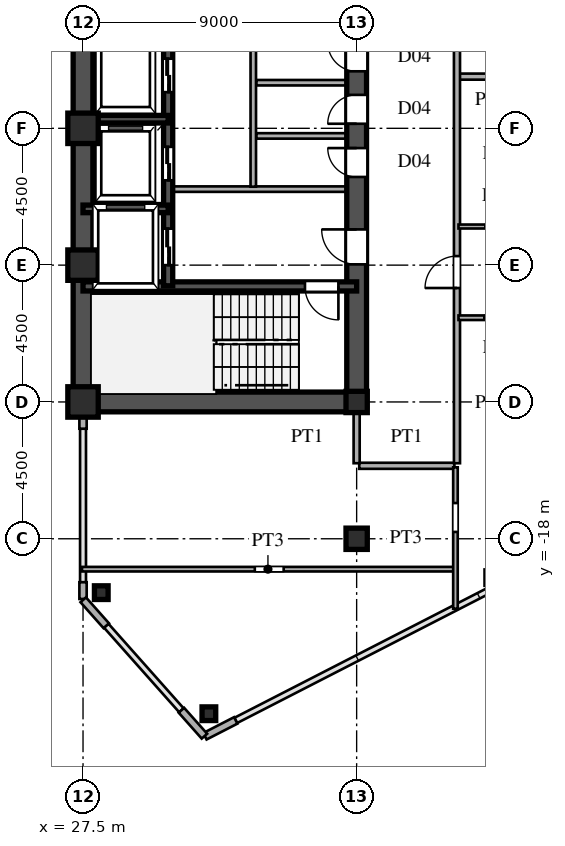
"""IFC4 building model, lengths in metres.
Left out: names, types, materials, properties, quantities, classifications, styles, units other than length and angle.
Written with IfcOpenShell. Run it as: python <this file> out.ifc"""

import sys

from ifc_helpers import new_model, si_unit, direction, frame, frame_2d, origin, origin_2d, place, context, subcontext, project, spatial, rectangle, hollow_rectangle, i_section, extrude, source, transform, mapped, element, fill, save


model = new_model("IFC4")
c1 = context("Model", 3, precision=1e-05, world=origin(), true_north=direction((0.0, 1.0)))
c2 = subcontext(c1, "Body", "Model", "MODEL_VIEW")
j1 = project(units=[si_unit("LENGTHUNIT", "METRE"), si_unit("PLANEANGLEUNIT", "RADIAN")], contexts=[c1])
p1 = place(None, origin())
s1 = spatial("IfcSite", under=j1, at=p1, CompositionType="ELEMENT")
p2 = place(p1, origin())
s2 = spatial("IfcBuilding", under=s1, at=p2, CompositionType="ELEMENT")
p3 = place(p2, frame((0.0, 0.0, 121.2)))
s3 = spatial("IfcBuildingStorey", under=s2, at=p3, CompositionType="ELEMENT", Elevation=121.2)
m1 = source(origin(), c2, "Body", "SweptSolid", [
    extrude(hollow_rectangle(XDim=1.0, YDim=1.0, WallThickness=0.042, at=origin_2d()), origin(), (0.0, 0.0, 1.0), 3.6),
])
for number, where, z_axis, x_axis in (
    (1, (27.5, -13.5, 0.0), (0.0, 0.0, 1.0), (1.0, 0.0, 0.0)),
    (2, (27.5, -9.0, 0.0), (0.0, 0.0, 1.0), (1.0, 0.0, 0.0)),
    (3, (27.5, -4.5, 0.0), (0.0, 0.0, 1.0), (1.0, 0.0, 0.0)),
):
    element("IfcColumn", number, at=place(p3, frame(where, z_axis=z_axis, x_axis=x_axis)), inside=s3, PredefinedType="COLUMN", context=c2, shape_type="MappedRepresentation", body=[
        mapped(m1, transform((0.0, 0.0, 0.0), scale=1.0)),
    ])
m2 = source(origin(), c2, "Body", "SweptSolid", [
    extrude(i_section(OverallWidth=0.7, OverallDepth=0.7, WebThickness=0.028, FlangeThickness=0.045, at=origin_2d()), origin(), (0.0, 0.0, 1.0), 3.6),
])
for number, where, z_axis, x_axis in (
    (4, (36.5, -18.0, 0.0), (0.0, 0.0, 1.0), (1.0, 0.0, 0.0)),
    (5, (36.5, -13.5, 0.0), (0.0, 0.0, 1.0), (1.0, 0.0, 0.0)),
):
    element("IfcColumn", number, at=place(p3, frame(where, z_axis=z_axis, x_axis=x_axis)), inside=s3, PredefinedType="COLUMN", context=c2, shape_type="MappedRepresentation", body=[
        mapped(m2, transform((0.0, 0.0, 0.0), scale=1.0)),
    ])
m3 = source(origin(), c2, "Body", "SweptSolid", [
    extrude(hollow_rectangle(XDim=0.45, YDim=0.45, WallThickness=0.018, at=origin_2d()), origin(), (0.0, 0.0, 1.0), 3.6),
])
for number, where, z_axis, x_axis in (
    (6, (31.64, -23.754, 0.0), (0.0, 0.0, 1.0), (1.0, 0.0, 0.0)),
    (7, (28.1, -19.772, 0.0), (0.0, 0.0, 1.0), (1.0, 0.0, 0.0)),
):
    element("IfcColumn", number, at=place(p3, frame(where, z_axis=z_axis, x_axis=x_axis)), inside=s3, PredefinedType="COLUMN", context=c2, shape_type="MappedRepresentation", body=[
        mapped(m3, transform((0.0, 0.0, 0.0), scale=1.0)),
    ])
p4 = place(p3, frame((31.509, -24.495, 0.0), z_axis=(0.0, 0.0, 1.0), x_axis=(0.889797395748, 0.456355776255, 0.0)))
e8 = element("IfcWall", 8, at=p4, inside=s3, PredefinedType="SOLIDWALL", context=c2, shape_type="SweptSolid", body=[
    extrude(rectangle(XDim=1.14, YDim=0.24, at=frame_2d((0.57, 0.0))), origin(), (0.0, 0.0, 1.0), 3.38),
])
p5 = place(p3, frame((27.5, -19.98, 0.0), z_axis=(0.0, 0.0, 1.0), x_axis=(0.0, 1.0, 0.0)))
e9 = element("IfcWall", 9, at=p5, inside=s3, PredefinedType="SOLIDWALL", context=c2, shape_type="SweptSolid", body=[
    extrude(rectangle(XDim=0.55, YDim=0.24, at=frame_2d((0.275, 0.0))), origin(), (0.0, 0.0, 1.0), 3.38),
])
p6 = place(p3, frame((27.5, -14.38, 0.0), z_axis=(0.0, 0.0, 1.0), x_axis=(0.0, 1.0, 0.0)))
e10 = element("IfcWall", 10, at=p6, inside=s3, PredefinedType="SOLIDWALL", context=c2, shape_type="SweptSolid", body=[
    extrude(rectangle(XDim=0.55, YDim=0.24, at=frame_2d((0.275, 0.0))), origin(), (0.0, 0.0, 1.0), 2.88),
])
for number, where, z_axis, x_axis in (
    (11, (27.507, -20.008, 0.0), (0.0, 0.0, 1.0), (0.664, -0.747, 0.0)),
    (12, (30.736, -23.64, 0.0), (0.0, 0.0, 1.0), (0.664, -0.747, 0.0)),
):
    element("IfcWall", number, at=place(p3, frame(where, z_axis=z_axis, x_axis=x_axis)), inside=s3, PredefinedType="SOLIDWALL", context=c2, shape_type="SweptSolid", body=[
        extrude(rectangle(XDim=1.14, YDim=0.24, at=frame_2d((0.57, 0.0))), origin(), (0.0, 0.0, 1.0), 3.38),
    ])
p7 = place(p3, frame((27.5, -13.5, 0.0), z_axis=(0.0, 0.0, 1.0), x_axis=(0.0, 1.0, 0.0)))
e13 = element("IfcWall", 13, at=p7, inside=s3, PredefinedType="SHEAR", context=c2, shape_type="SweptSolid", body=[
    extrude(rectangle(XDim=12.2, YDim=0.65, at=frame_2d((6.1, 0.0))), origin(), (0.0, 0.0, 1.0), 3.38),
])
p8 = place(p3, frame((27.5, -13.5, 0.0), z_axis=(0.0, 0.0, 1.0), x_axis=(1.0, 0.0, 0.0)))
e14 = element("IfcWall", 14, at=p8, inside=s3, PredefinedType="SHEAR", context=c2, shape_type="SweptSolid", body=[
    extrude(rectangle(XDim=9.0, YDim=0.65, at=frame_2d((4.5, 0.0))), origin(), (0.0, 0.0, 1.0), 3.38),
])
p9 = place(p3, frame((36.5, -13.65, 0.0), z_axis=(0.0, 0.0, 1.0), x_axis=(0.0, 1.0, 0.0)))
e15 = element("IfcWall", 15, at=p9, inside=s3, PredefinedType="SHEAR", context=c2, shape_type="SweptSolid", body=[
    extrude(rectangle(XDim=7.15, YDim=0.65, at=frame_2d((3.575, 0.0))), origin(), (0.0, 0.0, 1.0), 3.38),
])
p10 = place(p9, frame((4.675, 0.0, 0.0)))
e16 = element("IfcOpeningElement", 16, at=p10, cuts=e15, PredefinedType="OPENING", context=c2, shape_type="SweptSolid", body=[
    extrude(rectangle(XDim=1.15, YDim=2.2, at=frame_2d((0.575, 1.1))), frame((0.0, 0.335, 0.0), z_axis=(0.0, -1.0, 0.0), x_axis=(1.0, 0.0, 0.0)), (0.0, 0.0, 1.0), 0.67),
])
p11 = place(p3, frame((36.5, -6.5, 0.0), z_axis=(0.0, 0.0, 1.0), x_axis=(0.0, 1.0, 0.0)))
e17 = element("IfcWall", 17, at=p11, inside=s3, PredefinedType="SHEAR", context=c2, shape_type="SweptSolid", body=[
    extrude(rectangle(XDim=1.75, YDim=0.65, at=frame_2d((0.875, 0.0))), origin(), (0.0, 0.0, 1.0), 3.38),
])
p12 = place(p11, frame((0.4, 0.0, 0.0)))
e18 = element("IfcOpeningElement", 18, at=p12, cuts=e17, PredefinedType="OPENING", context=c2, shape_type="SweptSolid", body=[
    extrude(rectangle(XDim=0.95, YDim=2.15, at=frame_2d((0.475, 1.075))), frame((0.0, 0.335, 0.0), z_axis=(0.0, -1.0, 0.0), x_axis=(1.0, 0.0, 0.0)), (0.0, 0.0, 1.0), 0.67),
])
p13 = place(p3, frame((36.5, -4.75, 0.0), z_axis=(0.0, 0.0, 1.0), x_axis=(0.0, 1.0, 0.0)))
e19 = element("IfcWall", 19, at=p13, inside=s3, PredefinedType="SHEAR", context=c2, shape_type="SweptSolid", body=[
    extrude(rectangle(XDim=1.75, YDim=0.65, at=frame_2d((0.875, 0.0))), origin(), (0.0, 0.0, 1.0), 3.38),
])
p14 = place(p13, frame((0.4, 0.0, 0.0)))
e20 = element("IfcOpeningElement", 20, at=p14, cuts=e19, PredefinedType="OPENING", context=c2, shape_type="SweptSolid", body=[
    extrude(rectangle(XDim=0.95, YDim=2.15, at=frame_2d((0.475, 1.075))), frame((0.0, 0.335, 0.0), z_axis=(0.0, -1.0, 0.0), x_axis=(1.0, 0.0, 0.0)), (0.0, 0.0, 1.0), 0.67),
])
p15 = place(p3, frame((36.5, -3.0, 0.0), z_axis=(0.0, 0.0, 1.0), x_axis=(0.0, 1.0, 0.0)))
e21 = element("IfcWall", 21, at=p15, inside=s3, PredefinedType="SHEAR", context=c2, shape_type="SweptSolid", body=[
    extrude(rectangle(XDim=1.7, YDim=0.65, at=frame_2d((0.85, 0.0))), origin(), (0.0, 0.0, 1.0), 3.38),
])
p16 = place(p15, frame((0.375, 0.0, 0.0)))
e22 = element("IfcOpeningElement", 22, at=p16, cuts=e21, PredefinedType="OPENING", context=c2, shape_type="SweptSolid", body=[
    extrude(rectangle(XDim=0.95, YDim=2.15, at=frame_2d((0.475, 1.075))), frame((0.0, 0.335, 0.0), z_axis=(0.0, -1.0, 0.0), x_axis=(1.0, 0.0, 0.0)), (0.0, 0.0, 1.0), 0.67),
])
p17 = place(p3, frame((27.5, -9.7, 0.0), z_axis=(0.0, 0.0, 1.0), x_axis=(1.0, 0.0, 0.0)))
e23 = element("IfcWall", 23, at=p17, inside=s3, PredefinedType="SHEAR", context=c2, shape_type="SweptSolid", body=[
    extrude(rectangle(XDim=9.0, YDim=0.3, at=frame_2d((4.5, 0.0))), origin(), (0.0, 0.0, 1.0), 3.38),
])
p18 = place(p17, frame((7.3, 0.0, 0.0)))
e24 = element("IfcOpeningElement", 24, at=p18, cuts=e23, PredefinedType="OPENING", context=c2, shape_type="SweptSolid", body=[
    extrude(rectangle(XDim=1.1, YDim=2.2, at=frame_2d((0.55, 1.1))), frame((0.0, 0.16, 0.0), z_axis=(0.0, -1.0, 0.0), x_axis=(1.0, 0.0, 0.0)), (0.0, 0.0, 1.0), 0.32),
])
for number, where, z_axis, x_axis in (
    (25, (27.5, -7.15, 0.0), (0.0, 0.0, 1.0), (1.0, 0.0, 0.0)),
    (26, (27.5, -4.2, 0.0), (0.0, 0.0, 1.0), (1.0, 0.0, 0.0)),
):
    element("IfcWall", number, at=place(p3, frame(where, z_axis=z_axis, x_axis=x_axis)), inside=s3, PredefinedType="SHEAR", context=c2, shape_type="SweptSolid", body=[
        extrude(rectangle(XDim=2.8, YDim=0.25, at=frame_2d((1.4, 0.0))), origin(), (0.0, 0.0, 1.0), 3.38),
    ])
p19 = place(p3, frame((30.3, -9.68, 0.0), z_axis=(0.0, 0.0, 1.0), x_axis=(0.0, 1.0, 0.0)))
e27 = element("IfcWall", 27, at=p19, inside=s3, PredefinedType="SHEAR", context=c2, shape_type="SweptSolid", body=[
    extrude(rectangle(XDim=2.56, YDim=0.3, at=frame_2d((1.28, 0.0))), origin(), (0.0, 0.0, 1.0), 3.38),
])
p20 = place(p19, frame((0.68, 0.0, 0.0)))
e28 = element("IfcOpeningElement", 28, at=p20, cuts=e27, PredefinedType="OPENING", context=c2, shape_type="SweptSolid", body=[
    extrude(rectangle(XDim=1.2, YDim=2.25, at=frame_2d((0.6, 1.125))), frame((0.0, 0.16, 0.0), z_axis=(0.0, -1.0, 0.0), x_axis=(1.0, 0.0, 0.0)), (0.0, 0.0, 1.0), 0.32),
])
p21 = place(p3, frame((30.3, -7.12, 0.0), z_axis=(0.0, 0.0, 1.0), x_axis=(0.0, 1.0, 0.0)))
e29 = element("IfcWall", 29, at=p21, inside=s3, PredefinedType="SHEAR", context=c2, shape_type="SweptSolid", body=[
    extrude(rectangle(XDim=2.92, YDim=0.3, at=frame_2d((1.46, 0.0))), origin(), (0.0, 0.0, 1.0), 3.38),
])
p22 = place(p21, frame((0.91, 0.0, 0.0)))
e30 = element("IfcOpeningElement", 30, at=p22, cuts=e29, PredefinedType="OPENING", context=c2, shape_type="SweptSolid", body=[
    extrude(rectangle(XDim=1.1, YDim=2.2, at=frame_2d((0.55, 1.1))), frame((0.0, 0.16, 0.0), z_axis=(0.0, -1.0, 0.0), x_axis=(1.0, 0.0, 0.0)), (0.0, 0.0, 1.0), 0.32),
])
p23 = place(p3, frame((30.3, -4.2, 0.0), z_axis=(0.0, 0.0, 1.0), x_axis=(0.0, 1.0, 0.0)))
e31 = element("IfcWall", 31, at=p23, inside=s3, PredefinedType="SHEAR", context=c2, shape_type="SweptSolid", body=[
    extrude(rectangle(XDim=2.88, YDim=0.3, at=frame_2d((1.44, 0.0))), origin(), (0.0, 0.0, 1.0), 3.38),
])
p24 = place(p23, frame((0.89, 0.0, 0.0)))
e32 = element("IfcOpeningElement", 32, at=p24, cuts=e31, PredefinedType="OPENING", context=c2, shape_type="SweptSolid", body=[
    extrude(rectangle(XDim=1.1, YDim=2.2, at=frame_2d((0.55, 1.1))), frame((0.0, 0.16, 0.0), z_axis=(0.0, -1.0, 0.0), x_axis=(1.0, 0.0, 0.0)), (0.0, 0.0, 1.0), 0.32),
])
p25 = place(p3, frame((30.45, -6.5, 0.0), z_axis=(0.0, 0.0, 1.0), x_axis=(1.0, 0.0, 0.0)))
e33 = element("IfcWall", 33, at=p25, inside=s3, PredefinedType="PARTITIONING", context=c2, shape_type="SweptSolid", body=[
    extrude(rectangle(XDim=5.7, YDim=0.18, at=frame_2d((2.85, 0.0))), origin(), (0.0, 0.0, 1.0), 3.38),
])
p26 = place(p3, frame((33.1, -6.42, 0.0), z_axis=(0.0, 0.0, 1.0), x_axis=(0.0, 1.0, 0.0)))
e34 = element("IfcWall", 34, at=p26, inside=s3, PredefinedType="PARTITIONING", context=c2, shape_type="SweptSolid", body=[
    extrude(rectangle(XDim=5.04, YDim=0.18, at=frame_2d((2.52, 0.0))), origin(), (0.0, 0.0, 1.0), 3.38),
])
for number, where, z_axis, x_axis in (
    (35, (33.2, -4.75, 0.0), (0.0, 0.0, 1.0), (1.0, 0.0, 0.0)),
    (36, (33.2, -3.0, 0.0), (0.0, 0.0, 1.0), (1.0, 0.0, 0.0)),
):
    element("IfcWall", number, at=place(p3, frame(where, z_axis=z_axis, x_axis=x_axis)), inside=s3, PredefinedType="PARTITIONING", context=c2, shape_type="SweptSolid", body=[
        extrude(rectangle(XDim=2.95, YDim=0.18, at=frame_2d((1.475, 0.0))), origin(), (0.0, 0.0, 1.0), 3.38),
    ])
p27 = place(p3, frame((27.465, -19.0, 0.0), z_axis=(0.0, 0.0, 1.0), x_axis=(1.0, 0.0, 0.0)))
e37 = element("IfcWall", 37, at=p27, inside=s3, PredefinedType="PARTITIONING", context=c2, shape_type="SweptSolid", body=[
    extrude(rectangle(XDim=12.235, YDim=0.15, at=frame_2d((6.117, 0.0))), origin(), (0.0, 0.0, 1.0), 3.38),
])
p28 = place(p27, frame((5.685, 0.0, 0.0)))
e38 = element("IfcOpeningElement", 38, at=p28, cuts=e37, PredefinedType="OPENING", context=c2, shape_type="SweptSolid", body=[
    extrude(rectangle(XDim=0.95, YDim=2.15, at=frame_2d((0.475, 1.075))), frame((0.0, 0.085, 0.0), z_axis=(0.0, -1.0, 0.0), x_axis=(1.0, 0.0, 0.0)), (0.0, 0.0, 1.0), 0.17),
])
p29 = place(p3, frame((36.585, -15.6, 0.0), z_axis=(0.0, 0.0, 1.0), x_axis=(1.0, 0.0, 0.0)))
e39 = element("IfcWall", 39, at=p29, inside=s3, PredefinedType="PARTITIONING", context=c2, shape_type="SweptSolid", body=[
    extrude(rectangle(XDim=3.13, YDim=0.2, at=frame_2d((1.565, 0.0))), origin(), (0.0, 0.0, 1.0), 3.38),
])
p30 = place(p3, frame((39.85, -10.73, 0.0), z_axis=(0.0, 0.0, 1.0), x_axis=(1.0, 0.0, 0.0)))
e40 = element("IfcWall", 40, at=p30, inside=s3, PredefinedType="PARTITIONING", context=c2, shape_type="SweptSolid", body=[
    extrude(rectangle(XDim=2.65, YDim=0.15, at=frame_2d((1.325, 0.0))), origin(), (0.0, 0.0, 1.0), 3.38),
])
p31 = place(p30, frame((0.85, 0.0, 0.0)))
e41 = element("IfcOpeningElement", 41, at=p31, cuts=e40, PredefinedType="OPENING", context=c2, shape_type="SweptSolid", body=[
    extrude(rectangle(XDim=0.95, YDim=2.15, at=frame_2d((0.475, 1.075))), frame((0.0, 0.085, 0.0), z_axis=(0.0, -1.0, 0.0), x_axis=(1.0, 0.0, 0.0)), (0.0, 0.0, 1.0), 0.17),
])
p32 = place(p3, frame((39.85, -7.73, 0.0), z_axis=(0.0, 0.0, 1.0), x_axis=(1.0, 0.0, 0.0)))
e42 = element("IfcWall", 42, at=p32, inside=s3, PredefinedType="PARTITIONING", context=c2, shape_type="SweptSolid", body=[
    extrude(rectangle(XDim=2.65, YDim=0.13, at=frame_2d((1.325, 0.0))), origin(), (0.0, 0.0, 1.0), 3.38),
])
p33 = place(p32, frame((0.885, 0.0, 0.0)))
e43 = element("IfcOpeningElement", 43, at=p33, cuts=e42, PredefinedType="OPENING", context=c2, shape_type="SweptSolid", body=[
    extrude(rectangle(XDim=0.88, YDim=2.1, at=frame_2d((0.44, 1.05))), frame((0.0, 0.075, 0.0), z_axis=(0.0, -1.0, 0.0), x_axis=(1.0, 0.0, 0.0)), (0.0, 0.0, 1.0), 0.15),
])
p34 = place(p3, frame((39.88, -2.8, 0.0), z_axis=(0.0, 0.0, 1.0), x_axis=(1.0, 0.0, 0.0)))
e44 = element("IfcWall", 44, at=p34, inside=s3, PredefinedType="PARTITIONING", context=c2, shape_type="SweptSolid", body=[
    extrude(rectangle(XDim=29.625, YDim=0.2, at=frame_2d((14.812, 0.0))), origin(), (0.0, 0.0, 1.0), 3.38),
])
p35 = place(p3, frame((36.5, -15.515, 0.0), z_axis=(0.0, 0.0, 1.0), x_axis=(0.0, 1.0, 0.0)))
e45 = element("IfcWall", 45, at=p35, inside=s3, PredefinedType="PARTITIONING", context=c2, shape_type="SweptSolid", body=[
    extrude(rectangle(XDim=1.685, YDim=0.2, at=frame_2d((0.842, 0.0))), origin(), (0.0, 0.0, 1.0), 2.78),
])
p36 = place(p3, frame((39.75, -20.301, 0.0), z_axis=(0.0, 0.0, 1.0), x_axis=(0.0, 1.0, 0.0)))
e46 = element("IfcWall", 46, at=p36, inside=s3, PredefinedType="PARTITIONING", context=c2, shape_type="SweptSolid", body=[
    extrude(rectangle(XDim=4.651, YDim=0.15, at=frame_2d((2.326, 0.0))), origin(), (0.0, 0.0, 1.0), 3.38),
])
p37 = place(p36, frame((2.526, 0.0, 0.0)))
e47 = element("IfcOpeningElement", 47, at=p37, cuts=e46, PredefinedType="OPENING", context=c2, shape_type="SweptSolid", body=[
    extrude(rectangle(XDim=0.95, YDim=2.15, at=frame_2d((0.475, 1.075))), frame((0.0, 0.085, 0.0), z_axis=(0.0, -1.0, 0.0), x_axis=(1.0, 0.0, 0.0)), (0.0, 0.0, 1.0), 0.17),
])
p38 = place(p3, frame((39.8, -15.515, 0.0), z_axis=(0.0, 0.0, 1.0), x_axis=(0.0, 1.0, 0.0)))
e48 = element("IfcWall", 48, at=p38, inside=s3, PredefinedType="PARTITIONING", context=c2, shape_type="SweptSolid", body=[
    extrude(rectangle(XDim=31.03, YDim=0.2, at=frame_2d((15.515, 0.0))), origin(), (0.0, 0.0, 1.0), 3.38),
])
p39 = place(p38, frame((5.762, 0.0, 0.0)))
e49 = element("IfcOpeningElement", 49, at=p39, cuts=e48, PredefinedType="OPENING", context=c2, shape_type="SweptSolid", body=[
    extrude(rectangle(XDim=1.05, YDim=2.25, at=frame_2d((0.525, 1.125))), frame((0.0, 0.11, 0.0), z_axis=(0.0, -1.0, 0.0), x_axis=(1.0, 0.0, 0.0)), (0.0, 0.0, 1.0), 0.22),
])
p40 = place(p38, frame((18.301, 0.0, 0.0)))
e50 = element("IfcOpeningElement", 50, at=p40, cuts=e48, PredefinedType="OPENING", context=c2, shape_type="SweptSolid", body=[
    extrude(rectangle(XDim=1.05, YDim=2.25, at=frame_2d((0.525, 1.125))), frame((0.0, 0.11, 0.0), z_axis=(0.0, -1.0, 0.0), x_axis=(1.0, 0.0, 0.0)), (0.0, 0.0, 1.0), 0.22),
])
p41 = place(p38, frame((27.69, 0.0, 0.0)))
e51 = element("IfcOpeningElement", 51, at=p41, cuts=e48, PredefinedType="OPENING", context=c2, shape_type="SweptSolid", body=[
    extrude(rectangle(XDim=1.05, YDim=2.25, at=frame_2d((0.525, 1.125))), frame((0.0, 0.11, 0.0), z_axis=(0.0, -1.0, 0.0), x_axis=(1.0, 0.0, 0.0)), (0.0, 0.0, 1.0), 0.22),
])
m4 = source(origin(), c2, "Body", "SweptSolid", [
    extrude(rectangle(XDim=1.15, YDim=2.2, at=frame_2d((0.575, 1.1))), frame((0.0, 0.025, 0.0), z_axis=(0.0, -1.0, 0.0), x_axis=(1.0, 0.0, 0.0)), (0.0, 0.0, 1.0), 0.05),
])
p42 = place(p10, origin())
e52 = element("IfcDoor", 52, at=p42, inside=s3, OperationType="SINGLE_SWING_RIGHT", PredefinedType="DOOR", context=c2, shape_type="MappedRepresentation", body=[
    mapped(m4, transform((0.0, 0.0, 0.0), scale=1.0)),
])
fill(e16, e52)
m5 = source(origin(), c2, "Body", "SweptSolid", [
    extrude(rectangle(XDim=0.95, YDim=2.15, at=frame_2d((0.475, 1.075))), frame((0.0, 0.025, 0.0), z_axis=(0.0, -1.0, 0.0), x_axis=(1.0, 0.0, 0.0)), (0.0, 0.0, 1.0), 0.05),
])
p43 = place(p12, origin())
e53 = element("IfcDoor", 53, at=p43, inside=s3, OperationType="SINGLE_SWING_RIGHT", PredefinedType="DOOR", context=c2, shape_type="MappedRepresentation", body=[
    mapped(m5, transform((0.0, 0.0, 0.0), scale=1.0)),
])
fill(e18, e53)
p44 = place(p14, origin())
e54 = element("IfcDoor", 54, at=p44, inside=s3, OperationType="SINGLE_SWING_LEFT", PredefinedType="DOOR", context=c2, shape_type="MappedRepresentation", body=[
    mapped(m5, transform((0.0, 0.0, 0.0), scale=1.0)),
])
fill(e20, e54)
p45 = place(p16, origin())
e55 = element("IfcDoor", 55, at=p45, inside=s3, OperationType="SINGLE_SWING_RIGHT", PredefinedType="DOOR", context=c2, shape_type="MappedRepresentation", body=[
    mapped(m5, transform((0.0, 0.0, 0.0), scale=1.0)),
])
fill(e22, e55)
m6 = source(origin(), c2, "Body", "SweptSolid", [
    extrude(rectangle(XDim=1.1, YDim=2.2, at=frame_2d((0.55, 1.1))), frame((0.0, 0.025, 0.0), z_axis=(0.0, -1.0, 0.0), x_axis=(1.0, 0.0, 0.0)), (0.0, 0.0, 1.0), 0.05),
])
p46 = place(p18, frame((1.1, 0.0, 0.0), z_axis=(0.0, 0.0, 1.0), x_axis=(-1.0, 0.0, 0.0)))
e56 = element("IfcDoor", 56, at=p46, inside=s3, OperationType="SINGLE_SWING_RIGHT", PredefinedType="DOOR", context=c2, shape_type="MappedRepresentation", body=[
    mapped(m6, transform((0.0, 0.0, 0.0), scale=1.0)),
])
fill(e24, e56)
m7 = source(origin(), c2, "Body", "SweptSolid", [
    extrude(rectangle(XDim=1.2, YDim=2.25, at=frame_2d((0.6, 1.125))), frame((0.0, 0.025, 0.0), z_axis=(0.0, -1.0, 0.0), x_axis=(1.0, 0.0, 0.0)), (0.0, 0.0, 1.0), 0.05),
])
p47 = place(p20, origin())
e57 = element("IfcDoor", 57, at=p47, inside=s3, OperationType="DOUBLE_DOOR_SLIDING", PredefinedType="DOOR", context=c2, shape_type="MappedRepresentation", body=[
    mapped(m7, transform((0.0, 0.0, 0.0), scale=1.0)),
])
fill(e28, e57)
m8 = source(origin(), c2, "Body", "SweptSolid", [
    extrude(rectangle(XDim=1.1, YDim=2.2, at=frame_2d((0.55, 1.1))), frame((0.0, 0.025, 0.0), z_axis=(0.0, -1.0, 0.0), x_axis=(1.0, 0.0, 0.0)), (0.0, 0.0, 1.0), 0.05),
])
p48 = place(p22, origin())
e58 = element("IfcDoor", 58, at=p48, inside=s3, OperationType="DOUBLE_DOOR_SLIDING", PredefinedType="DOOR", context=c2, shape_type="MappedRepresentation", body=[
    mapped(m8, transform((0.0, 0.0, 0.0), scale=1.0)),
])
fill(e30, e58)
p49 = place(p24, origin())
e59 = element("IfcDoor", 59, at=p49, inside=s3, OperationType="DOUBLE_DOOR_SLIDING", PredefinedType="DOOR", context=c2, shape_type="MappedRepresentation", body=[
    mapped(m8, transform((0.0, 0.0, 0.0), scale=1.0)),
])
fill(e32, e59)
m9 = source(origin(), c2, "Body", "SweptSolid", [
    extrude(rectangle(XDim=0.88, YDim=2.1, at=frame_2d((0.44, 1.05))), frame((0.0, 0.025, 0.0), z_axis=(0.0, -1.0, 0.0), x_axis=(1.0, 0.0, 0.0)), (0.0, 0.0, 1.0), 0.05),
])
p50 = place(p33, origin())
e60 = element("IfcDoor", 60, at=p50, inside=s3, OperationType="SINGLE_SWING_RIGHT", PredefinedType="DOOR", context=c2, shape_type="MappedRepresentation", body=[
    mapped(m9, transform((0.0, 0.0, 0.0), scale=1.0)),
])
fill(e43, e60)
m10 = source(origin(), c2, "Body", "SweptSolid", [
    extrude(rectangle(XDim=1.05, YDim=2.25, at=frame_2d((0.525, 1.125))), frame((0.0, 0.025, 0.0), z_axis=(0.0, -1.0, 0.0), x_axis=(1.0, 0.0, 0.0)), (0.0, 0.0, 1.0), 0.05),
])
p51 = place(p39, origin())
e61 = element("IfcDoor", 61, at=p51, inside=s3, OperationType="SINGLE_SWING_LEFT", PredefinedType="DOOR", context=c2, shape_type="MappedRepresentation", body=[
    mapped(m10, transform((0.0, 0.0, 0.0), scale=1.0)),
])
fill(e49, e61)
save(model, sys.argv[1])
